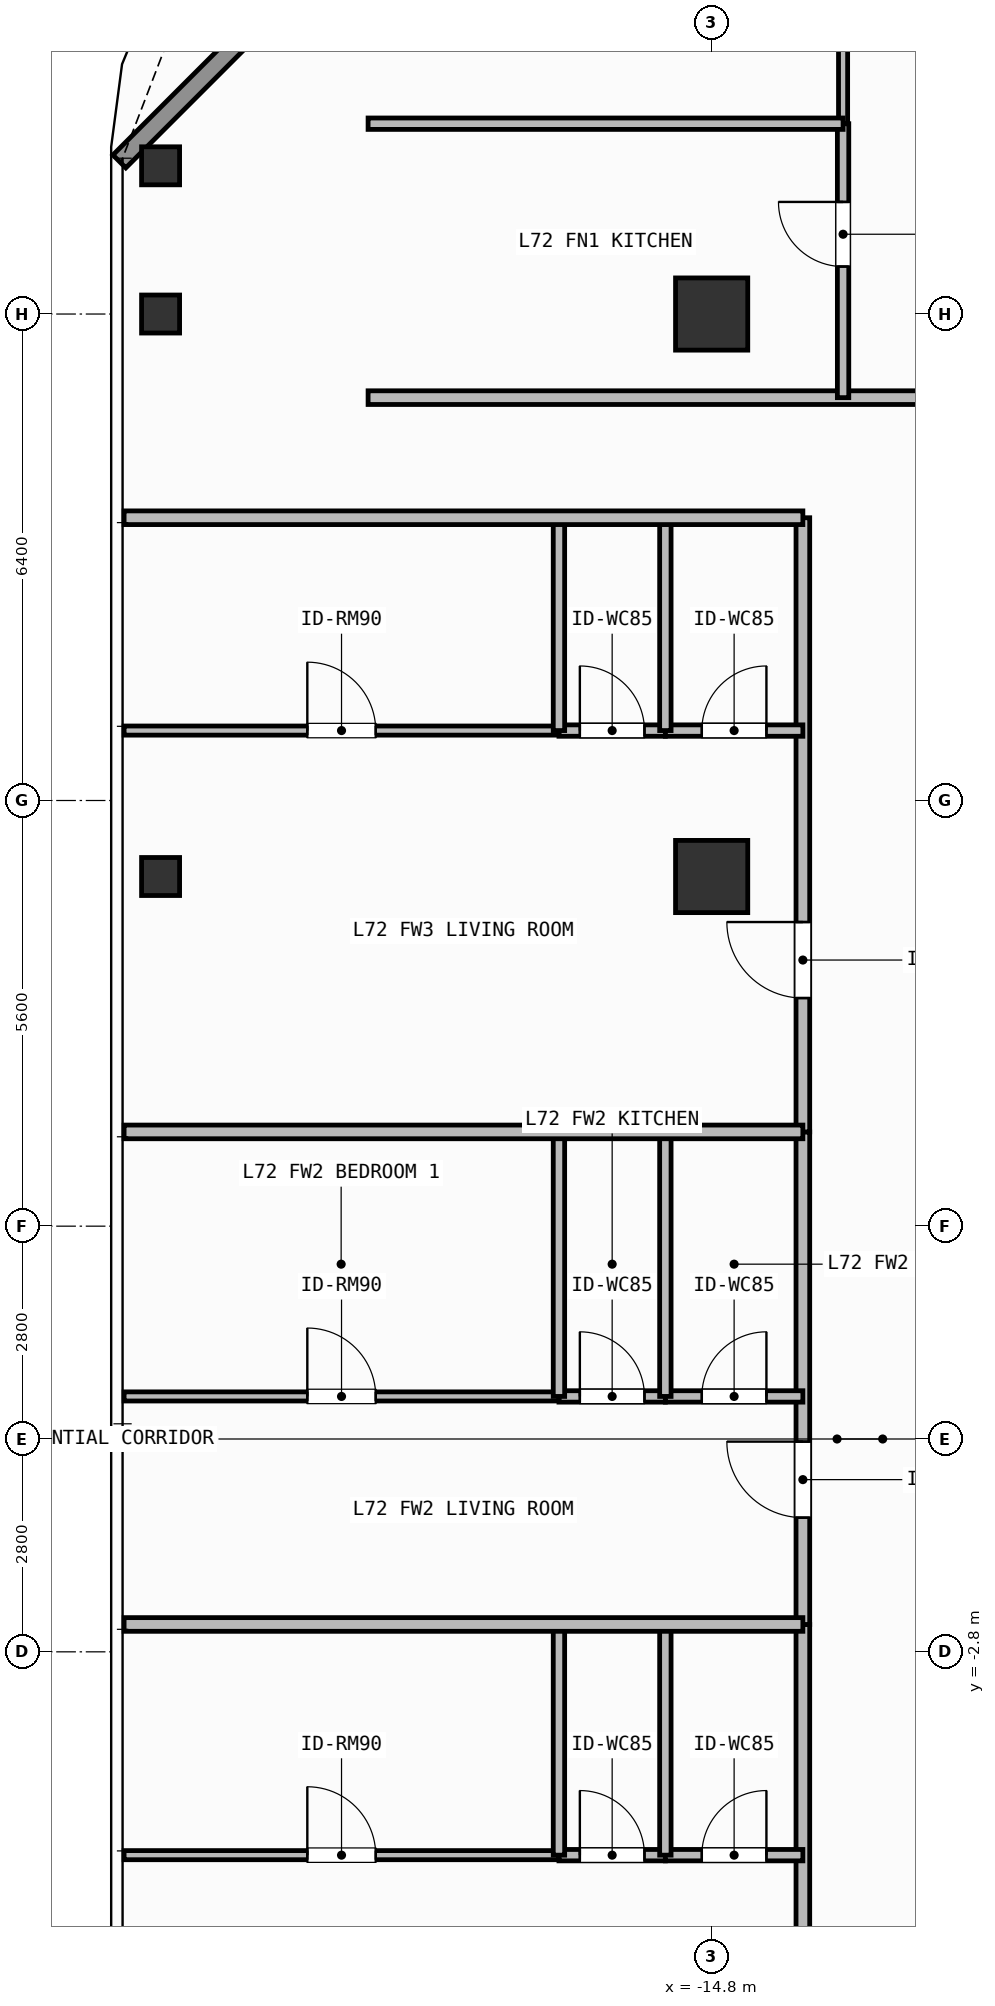
"""IFC4 building model, lengths in metres.
Left out: names, types, materials, properties, quantities, classifications, styles, units other than length and angle.
Written with IfcOpenShell. Run it as: python <this file> out.ifc"""

import sys

from ifc_helpers import new_model, si_unit, direction, frame, frame_2d, origin, origin_2d, place, context, subcontext, project, spatial, rectangle, hollow_rectangle, extrude, element, fill, save


model = new_model("IFC4")
c1 = context("Model", 3, precision=1e-05, world=origin(), true_north=direction((0.0, 1.0)))
c2 = subcontext(c1, "Body", "Model", "MODEL_VIEW")
j1 = project(units=[si_unit("LENGTHUNIT", "METRE"), si_unit("PLANEANGLEUNIT", "RADIAN")], contexts=[c1])
p1 = place(None, origin())
s1 = spatial("IfcSite", under=j1, at=p1, CompositionType="ELEMENT")
p2 = place(p1, origin())
s2 = spatial("IfcBuilding", under=s1, at=p2, CompositionType="ELEMENT")
p3 = place(p2, frame((0.0, 0.0, 293.7)))
s3 = spatial("IfcBuildingStorey", under=s2, at=p3, CompositionType="ELEMENT", Elevation=293.7)
for number, where, z_axis, x_axis in (
    (1, (-14.8, 14.8, 0.0), (0.0, 0.0, 1.0), (1.0, 0.0, 0.0)),
    (2, (-14.8, 7.4, 0.0), (0.0, 0.0, 1.0), (1.0, 0.0, 0.0)),
):
    element("IfcColumn", number, at=place(p3, frame(where, z_axis=z_axis, x_axis=x_axis)), inside=s3, PredefinedType="COLUMN", context=c2, shape_type="SweptSolid", body=[
        extrude(rectangle(XDim=0.95, YDim=0.95, at=origin_2d()), origin(), (0.0, 0.0, 1.0), 3.9),
    ])
for number, where, z_axis, x_axis in (
    (3, (-22.05, 16.75, 0.0), (0.0, 0.0, 1.0), (1.0, 0.0, 0.0)),
    (4, (-22.05, 7.4, 0.0), (0.0, 0.0, 1.0), (1.0, 0.0, 0.0)),
    (5, (-22.05, 14.8, 0.0), (0.0, 0.0, 1.0), (1.0, 0.0, 0.0)),
):
    element("IfcColumn", number, at=place(p3, frame(where, z_axis=z_axis, x_axis=x_axis)), inside=s3, PredefinedType="COLUMN", context=c2, shape_type="SweptSolid", body=[
        extrude(hollow_rectangle(XDim=0.5, YDim=0.5, WallThickness=0.025, at=origin_2d()), origin(), (0.0, 0.0, 1.0), 3.9),
    ])
p4 = place(p3, frame((-22.592, 16.808, 0.0), z_axis=(0.0, 0.0, 1.0), x_axis=(0.707106781187, 0.707106781187, 0.0)))
e6 = element("IfcWall", 6, at=p4, inside=s3, PredefinedType="SOLIDWALL", context=c2, shape_type="SweptSolid", body=[
    extrude(rectangle(XDim=6.059, YDim=0.24, at=frame_2d((3.03, 0.0))), origin(), (0.0, 0.0, 1.0), 3.68),
])
p5 = place(p4, frame((2.28, 0.0, 0.8)))
e7 = element("IfcOpeningElement", 7, at=p5, cuts=e6, PredefinedType="OPENING", context=c2, shape_type="SweptSolid", body=[
    extrude(rectangle(XDim=1.5, YDim=1.85, at=frame_2d((0.75, 0.925))), frame((0.0, 0.13, 0.0), z_axis=(0.0, -1.0, 0.0), x_axis=(1.0, 0.0, 0.0)), (0.0, 0.0, 1.0), 0.26),
])
p6 = place(p3, frame((-19.32, 13.7, 0.0), z_axis=(0.0, 0.0, 1.0), x_axis=(1.0, 0.0, 0.0)))
e8 = element("IfcWall", 8, at=p6, inside=s3, PredefinedType="PARTITIONING", context=c2, shape_type="SweptSolid", body=[
    extrude(rectangle(XDim=15.623, YDim=0.18, at=frame_2d((7.812, 0.0))), origin(), (0.0, 0.0, 1.0), 3.68),
])
p7 = place(p6, frame((7.669, 0.0, 0.0)))
e9 = element("IfcOpeningElement", 9, at=p7, cuts=e8, PredefinedType="OPENING", context=c2, shape_type="SweptSolid", body=[
    extrude(rectangle(XDim=1.0, YDim=2.2, at=frame_2d((0.5, 1.1))), frame((0.0, 0.1, 0.0), z_axis=(0.0, -1.0, 0.0), x_axis=(1.0, 0.0, 0.0)), (0.0, 0.0, 1.0), 0.2),
])
p8 = place(p3, frame((-13.071, 13.7, 0.0), z_axis=(0.0, 0.0, 1.0), x_axis=(0.0, 1.0, 0.0)))
e10 = element("IfcWall", 10, at=p8, inside=s3, PredefinedType="PARTITIONING", context=c2, shape_type="SweptSolid", body=[
    extrude(rectangle(XDim=3.604, YDim=0.15, at=frame_2d((1.802, 0.0))), origin(), (0.0, 0.0, 1.0), 3.68),
])
p9 = place(p8, frame((1.725, 0.0, 0.0)))
e11 = element("IfcOpeningElement", 11, at=p9, cuts=e10, PredefinedType="OPENING", context=c2, shape_type="SweptSolid", body=[
    extrude(rectangle(XDim=0.85, YDim=2.1, at=frame_2d((0.425, 1.05))), frame((0.0, 0.085, 0.0), z_axis=(0.0, -1.0, 0.0), x_axis=(1.0, 0.0, 0.0)), (0.0, 0.0, 1.0), 0.17),
])
p10 = place(p3, frame((-13.071, 17.304, 0.0), z_axis=(0.0, 0.0, 1.0), x_axis=(0.0, 1.0, 0.0)))
e12 = element("IfcWall", 12, at=p10, inside=s3, PredefinedType="PARTITIONING", context=c2, shape_type="SweptSolid", body=[
    extrude(rectangle(XDim=3.726, YDim=0.12, at=frame_2d((1.863, 0.0))), origin(), (0.0, 0.0, 1.0), 3.68),
])
p11 = place(p10, frame((1.413, 0.0, 0.0)))
e13 = element("IfcOpeningElement", 13, at=p11, cuts=e12, PredefinedType="OPENING", context=c2, shape_type="SweptSolid", body=[
    extrude(rectangle(XDim=0.9, YDim=2.1, at=frame_2d((0.45, 1.05))), frame((0.0, 0.07, 0.0), z_axis=(0.0, -1.0, 0.0), x_axis=(1.0, 0.0, 0.0)), (0.0, 0.0, 1.0), 0.14),
])
p12 = place(p3, frame((-13.6, -12.12, 0.0), z_axis=(0.0, 0.0, 1.0), x_axis=(0.0, 1.0, 0.0)))
e14 = element("IfcWall", 14, at=p12, inside=s3, PredefinedType="PARTITIONING", context=c2, shape_type="SweptSolid", body=[
    extrude(rectangle(XDim=9.68, YDim=0.18, at=frame_2d((4.84, 0.0))), origin(), (0.0, 0.0, 1.0), 3.68),
])
p13 = place(p12, frame((3.006, 0.0, 0.0)))
e15 = element("IfcOpeningElement", 15, at=p13, cuts=e14, PredefinedType="OPENING", context=c2, shape_type="SweptSolid", body=[
    extrude(rectangle(XDim=1.0, YDim=2.2, at=frame_2d((0.5, 1.1))), frame((0.0, 0.1, 0.0), z_axis=(0.0, -1.0, 0.0), x_axis=(1.0, 0.0, 0.0)), (0.0, 0.0, 1.0), 0.2),
])
p14 = place(p3, frame((-16.809, -5.475, 0.0), z_axis=(0.0, 0.0, 1.0), x_axis=(1.0, 0.0, 0.0)))
e16 = element("IfcWall", 16, at=p14, inside=s3, PredefinedType="PARTITIONING", context=c2, shape_type="SweptSolid", body=[
    extrude(rectangle(XDim=1.4, YDim=0.15, at=frame_2d((0.7, 0.0))), origin(), (0.0, 0.0, 1.0), 3.68),
])
p15 = place(p14, frame((0.275, 0.0, 0.0)))
e17 = element("IfcOpeningElement", 17, at=p15, cuts=e16, PredefinedType="OPENING", context=c2, shape_type="SweptSolid", body=[
    extrude(rectangle(XDim=0.85, YDim=2.1, at=frame_2d((0.425, 1.05))), frame((0.0, 0.085, 0.0), z_axis=(0.0, -1.0, 0.0), x_axis=(1.0, 0.0, 0.0)), (0.0, 0.0, 1.0), 0.17),
])
p16 = place(p3, frame((-15.409, -5.475, 0.0), z_axis=(0.0, 0.0, 1.0), x_axis=(1.0, 0.0, 0.0)))
e18 = element("IfcWall", 18, at=p16, inside=s3, PredefinedType="PARTITIONING", context=c2, shape_type="SweptSolid", body=[
    extrude(rectangle(XDim=1.809, YDim=0.15, at=frame_2d((0.904, 0.0))), origin(), (0.0, 0.0, 1.0), 3.68),
])
p17 = place(p16, frame((0.479, 0.0, 0.0)))
e19 = element("IfcOpeningElement", 19, at=p17, cuts=e18, PredefinedType="OPENING", context=c2, shape_type="SweptSolid", body=[
    extrude(rectangle(XDim=0.85, YDim=2.1, at=frame_2d((0.425, 1.05))), frame((0.0, 0.085, 0.0), z_axis=(0.0, -1.0, 0.0), x_axis=(1.0, 0.0, 0.0)), (0.0, 0.0, 1.0), 0.17),
])
p18 = place(p3, frame((-22.53, -5.475, 0.0), z_axis=(0.0, 0.0, 1.0), x_axis=(1.0, 0.0, 0.0)))
e20 = element("IfcWall", 20, at=p18, inside=s3, PredefinedType="PARTITIONING", context=c2, shape_type="SweptSolid", body=[
    extrude(rectangle(XDim=5.721, YDim=0.12, at=frame_2d((2.86, 0.0))), origin(), (0.0, 0.0, 1.0), 3.68),
])
p19 = place(p18, frame((2.41, 0.0, 0.0)))
e21 = element("IfcOpeningElement", 21, at=p19, cuts=e20, PredefinedType="OPENING", context=c2, shape_type="SweptSolid", body=[
    extrude(rectangle(XDim=0.9, YDim=2.1, at=frame_2d((0.45, 1.05))), frame((0.0, 0.07, 0.0), z_axis=(0.0, -1.0, 0.0), x_axis=(1.0, 0.0, 0.0)), (0.0, 0.0, 1.0), 0.14),
])
p20 = place(p3, frame((-13.6, -2.44, 0.0), z_axis=(0.0, 0.0, 1.0), x_axis=(0.0, 1.0, 0.0)))
e22 = element("IfcWall", 22, at=p20, inside=s3, PredefinedType="PARTITIONING", context=c2, shape_type="SweptSolid", body=[
    extrude(rectangle(XDim=6.48, YDim=0.18, at=frame_2d((3.24, 0.0))), origin(), (0.0, 0.0, 1.0), 3.68),
])
p21 = place(p20, frame((1.406, 0.0, 0.0)))
e23 = element("IfcOpeningElement", 23, at=p21, cuts=e22, PredefinedType="OPENING", context=c2, shape_type="SweptSolid", body=[
    extrude(rectangle(XDim=1.0, YDim=2.2, at=frame_2d((0.5, 1.1))), frame((0.0, 0.1, 0.0), z_axis=(0.0, -1.0, 0.0), x_axis=(1.0, 0.0, 0.0)), (0.0, 0.0, 1.0), 0.2),
])
p22 = place(p3, frame((-16.809, 0.56, 0.0), z_axis=(0.0, 0.0, 1.0), x_axis=(1.0, 0.0, 0.0)))
e24 = element("IfcWall", 24, at=p22, inside=s3, PredefinedType="PARTITIONING", context=c2, shape_type="SweptSolid", body=[
    extrude(rectangle(XDim=1.4, YDim=0.15, at=frame_2d((0.7, 0.0))), origin(), (0.0, 0.0, 1.0), 3.68),
])
p23 = place(p22, frame((0.275, 0.0, 0.0)))
e25 = element("IfcOpeningElement", 25, at=p23, cuts=e24, PredefinedType="OPENING", context=c2, shape_type="SweptSolid", body=[
    extrude(rectangle(XDim=0.85, YDim=2.1, at=frame_2d((0.425, 1.05))), frame((0.0, 0.085, 0.0), z_axis=(0.0, -1.0, 0.0), x_axis=(1.0, 0.0, 0.0)), (0.0, 0.0, 1.0), 0.17),
])
p24 = place(p3, frame((-15.409, 0.56, 0.0), z_axis=(0.0, 0.0, 1.0), x_axis=(1.0, 0.0, 0.0)))
e26 = element("IfcWall", 26, at=p24, inside=s3, PredefinedType="PARTITIONING", context=c2, shape_type="SweptSolid", body=[
    extrude(rectangle(XDim=1.809, YDim=0.15, at=frame_2d((0.904, 0.0))), origin(), (0.0, 0.0, 1.0), 3.68),
])
p25 = place(p24, frame((0.479, 0.0, 0.0)))
e27 = element("IfcOpeningElement", 27, at=p25, cuts=e26, PredefinedType="OPENING", context=c2, shape_type="SweptSolid", body=[
    extrude(rectangle(XDim=0.85, YDim=2.1, at=frame_2d((0.425, 1.05))), frame((0.0, 0.085, 0.0), z_axis=(0.0, -1.0, 0.0), x_axis=(1.0, 0.0, 0.0)), (0.0, 0.0, 1.0), 0.17),
])
p26 = place(p3, frame((-22.53, 0.56, 0.0), z_axis=(0.0, 0.0, 1.0), x_axis=(1.0, 0.0, 0.0)))
e28 = element("IfcWall", 28, at=p26, inside=s3, PredefinedType="PARTITIONING", context=c2, shape_type="SweptSolid", body=[
    extrude(rectangle(XDim=5.721, YDim=0.12, at=frame_2d((2.86, 0.0))), origin(), (0.0, 0.0, 1.0), 3.68),
])
p27 = place(p26, frame((2.41, 0.0, 0.0)))
e29 = element("IfcOpeningElement", 29, at=p27, cuts=e28, PredefinedType="OPENING", context=c2, shape_type="SweptSolid", body=[
    extrude(rectangle(XDim=0.9, YDim=2.1, at=frame_2d((0.45, 1.05))), frame((0.0, 0.07, 0.0), z_axis=(0.0, -1.0, 0.0), x_axis=(1.0, 0.0, 0.0)), (0.0, 0.0, 1.0), 0.14),
])
p28 = place(p3, frame((-13.6, 4.04, 0.0), z_axis=(0.0, 0.0, 1.0), x_axis=(0.0, 1.0, 0.0)))
e30 = element("IfcWall", 30, at=p28, inside=s3, PredefinedType="PARTITIONING", context=c2, shape_type="SweptSolid", body=[
    extrude(rectangle(XDim=8.08, YDim=0.18, at=frame_2d((4.04, 0.0))), origin(), (0.0, 0.0, 1.0), 3.68),
])
p29 = place(p28, frame((1.761, 0.0, 0.0)))
e31 = element("IfcOpeningElement", 31, at=p29, cuts=e30, PredefinedType="OPENING", context=c2, shape_type="SweptSolid", body=[
    extrude(rectangle(XDim=1.0, YDim=2.2, at=frame_2d((0.5, 1.1))), frame((0.0, 0.1, 0.0), z_axis=(0.0, -1.0, 0.0), x_axis=(1.0, 0.0, 0.0)), (0.0, 0.0, 1.0), 0.2),
])
p30 = place(p3, frame((-16.809, 9.32, 0.0), z_axis=(0.0, 0.0, 1.0), x_axis=(1.0, 0.0, 0.0)))
e32 = element("IfcWall", 32, at=p30, inside=s3, PredefinedType="PARTITIONING", context=c2, shape_type="SweptSolid", body=[
    extrude(rectangle(XDim=1.4, YDim=0.15, at=frame_2d((0.7, 0.0))), origin(), (0.0, 0.0, 1.0), 3.68),
])
p31 = place(p30, frame((0.275, 0.0, 0.0)))
e33 = element("IfcOpeningElement", 33, at=p31, cuts=e32, PredefinedType="OPENING", context=c2, shape_type="SweptSolid", body=[
    extrude(rectangle(XDim=0.85, YDim=2.1, at=frame_2d((0.425, 1.05))), frame((0.0, 0.085, 0.0), z_axis=(0.0, -1.0, 0.0), x_axis=(1.0, 0.0, 0.0)), (0.0, 0.0, 1.0), 0.17),
])
p32 = place(p3, frame((-15.409, 9.32, 0.0), z_axis=(0.0, 0.0, 1.0), x_axis=(1.0, 0.0, 0.0)))
e34 = element("IfcWall", 34, at=p32, inside=s3, PredefinedType="PARTITIONING", context=c2, shape_type="SweptSolid", body=[
    extrude(rectangle(XDim=1.809, YDim=0.15, at=frame_2d((0.904, 0.0))), origin(), (0.0, 0.0, 1.0), 3.68),
])
p33 = place(p32, frame((0.479, 0.0, 0.0)))
e35 = element("IfcOpeningElement", 35, at=p33, cuts=e34, PredefinedType="OPENING", context=c2, shape_type="SweptSolid", body=[
    extrude(rectangle(XDim=0.85, YDim=2.1, at=frame_2d((0.425, 1.05))), frame((0.0, 0.085, 0.0), z_axis=(0.0, -1.0, 0.0), x_axis=(1.0, 0.0, 0.0)), (0.0, 0.0, 1.0), 0.17),
])
p34 = place(p3, frame((-22.53, 9.32, 0.0), z_axis=(0.0, 0.0, 1.0), x_axis=(1.0, 0.0, 0.0)))
e36 = element("IfcWall", 36, at=p34, inside=s3, PredefinedType="PARTITIONING", context=c2, shape_type="SweptSolid", body=[
    extrude(rectangle(XDim=5.721, YDim=0.12, at=frame_2d((2.86, 0.0))), origin(), (0.0, 0.0, 1.0), 3.68),
])
p35 = place(p34, frame((2.41, 0.0, 0.0)))
e37 = element("IfcOpeningElement", 37, at=p35, cuts=e36, PredefinedType="OPENING", context=c2, shape_type="SweptSolid", body=[
    extrude(rectangle(XDim=0.9, YDim=2.1, at=frame_2d((0.45, 1.05))), frame((0.0, 0.07, 0.0), z_axis=(0.0, -1.0, 0.0), x_axis=(1.0, 0.0, 0.0)), (0.0, 0.0, 1.0), 0.14),
])
p36 = place(p3, frame((-19.32, 17.304, 0.0), z_axis=(0.0, 0.0, 1.0), x_axis=(1.0, 0.0, 0.0)))
e38 = element("IfcWall", 38, at=p36, inside=s3, PredefinedType="PARTITIONING", context=c2, shape_type="SweptSolid", body=[
    extrude(rectangle(XDim=6.249, YDim=0.15, at=frame_2d((3.125, 0.0))), origin(), (0.0, 0.0, 1.0), 3.68),
])
for number, where, z_axis, x_axis in (
    (39, (-15.409, -5.475, 0.0), (0.0, 0.0, 1.0), (0.0, 1.0, 0.0)),
    (40, (-16.809, -5.475, 0.0), (0.0, 0.0, 1.0), (0.0, 1.0, 0.0)),
):
    element("IfcWall", number, at=place(p3, frame(where, z_axis=z_axis, x_axis=x_axis)), inside=s3, PredefinedType="PARTITIONING", context=c2, shape_type="SweptSolid", body=[
        extrude(rectangle(XDim=3.035, YDim=0.15, at=frame_2d((1.518, 0.0))), origin(), (0.0, 0.0, 1.0), 3.68),
    ])
for number, where, z_axis, x_axis in (
    (41, (-15.409, 0.56, 0.0), (0.0, 0.0, 1.0), (0.0, 1.0, 0.0)),
    (42, (-16.809, 0.56, 0.0), (0.0, 0.0, 1.0), (0.0, 1.0, 0.0)),
):
    element("IfcWall", number, at=place(p3, frame(where, z_axis=z_axis, x_axis=x_axis)), inside=s3, PredefinedType="PARTITIONING", context=c2, shape_type="SweptSolid", body=[
        extrude(rectangle(XDim=3.48, YDim=0.15, at=frame_2d((1.74, 0.0))), origin(), (0.0, 0.0, 1.0), 3.68),
    ])
p37 = place(p3, frame((-22.53, -2.44, 0.0), z_axis=(0.0, 0.0, 1.0), x_axis=(1.0, 0.0, 0.0)))
e43 = element("IfcWall", 43, at=p37, inside=s3, PredefinedType="PARTITIONING", context=c2, shape_type="SweptSolid", body=[
    extrude(rectangle(XDim=8.93, YDim=0.18, at=frame_2d((4.465, 0.0))), origin(), (0.0, 0.0, 1.0), 3.68),
])
for number, where, z_axis, x_axis in (
    (44, (-15.409, 9.32, 0.0), (0.0, 0.0, 1.0), (0.0, 1.0, 0.0)),
    (45, (-16.809, 9.32, 0.0), (0.0, 0.0, 1.0), (0.0, 1.0, 0.0)),
):
    element("IfcWall", number, at=place(p3, frame(where, z_axis=z_axis, x_axis=x_axis)), inside=s3, PredefinedType="PARTITIONING", context=c2, shape_type="SweptSolid", body=[
        extrude(rectangle(XDim=2.8, YDim=0.15, at=frame_2d((1.4, 0.0))), origin(), (0.0, 0.0, 1.0), 3.68),
    ])
for number, where, z_axis, x_axis in (
    (46, (-22.53, 4.04, 0.0), (0.0, 0.0, 1.0), (1.0, 0.0, 0.0)),
    (47, (-22.53, 12.12, 0.0), (0.0, 0.0, 1.0), (1.0, 0.0, 0.0)),
):
    element("IfcWall", number, at=place(p3, frame(where, z_axis=z_axis, x_axis=x_axis)), inside=s3, PredefinedType="PARTITIONING", context=c2, shape_type="SweptSolid", body=[
        extrude(rectangle(XDim=8.93, YDim=0.18, at=frame_2d((4.465, 0.0))), origin(), (0.0, 0.0, 1.0), 3.68),
    ])
p38 = place(p9, origin())
e48 = element("IfcDoor", 48, at=p38, inside=s3, OperationType="SINGLE_SWING_RIGHT", PredefinedType="DOOR", context=c2, shape_type="SweptSolid", body=[
    extrude(rectangle(XDim=0.85, YDim=2.1, at=frame_2d((0.425, 1.05))), frame((0.0, 0.025, 0.0), z_axis=(0.0, -1.0, 0.0), x_axis=(1.0, 0.0, 0.0)), (0.0, 0.0, 1.0), 0.05),
])
fill(e11, e48)
p39 = place(p15, origin())
e49 = element("IfcDoor", 49, at=p39, inside=s3, OperationType="SINGLE_SWING_LEFT", PredefinedType="DOOR", context=c2, shape_type="SweptSolid", body=[
    extrude(rectangle(XDim=0.85, YDim=2.1, at=frame_2d((0.425, 1.05))), frame((0.0, 0.025, 0.0), z_axis=(0.0, -1.0, 0.0), x_axis=(1.0, 0.0, 0.0)), (0.0, 0.0, 1.0), 0.05),
])
fill(e17, e49)
p40 = place(p17, origin())
e50 = element("IfcDoor", 50, at=p40, inside=s3, OperationType="SINGLE_SWING_RIGHT", PredefinedType="DOOR", context=c2, shape_type="SweptSolid", body=[
    extrude(rectangle(XDim=0.85, YDim=2.1, at=frame_2d((0.425, 1.05))), frame((0.0, 0.025, 0.0), z_axis=(0.0, -1.0, 0.0), x_axis=(1.0, 0.0, 0.0)), (0.0, 0.0, 1.0), 0.05),
])
fill(e19, e50)
p41 = place(p19, origin())
e51 = element("IfcDoor", 51, at=p41, inside=s3, OperationType="SINGLE_SWING_LEFT", PredefinedType="DOOR", context=c2, shape_type="SweptSolid", body=[
    extrude(rectangle(XDim=0.9, YDim=2.1, at=frame_2d((0.45, 1.05))), frame((0.0, 0.025, 0.0), z_axis=(0.0, -1.0, 0.0), x_axis=(1.0, 0.0, 0.0)), (0.0, 0.0, 1.0), 0.05),
])
fill(e21, e51)
p42 = place(p21, origin())
e52 = element("IfcDoor", 52, at=p42, inside=s3, OperationType="SINGLE_SWING_RIGHT", PredefinedType="DOOR", context=c2, shape_type="SweptSolid", body=[
    extrude(rectangle(XDim=1.0, YDim=2.2, at=frame_2d((0.5, 1.1))), frame((0.0, 0.025, 0.0), z_axis=(0.0, -1.0, 0.0), x_axis=(1.0, 0.0, 0.0)), (0.0, 0.0, 1.0), 0.05),
])
fill(e23, e52)
p43 = place(p23, origin())
e53 = element("IfcDoor", 53, at=p43, inside=s3, OperationType="SINGLE_SWING_LEFT", PredefinedType="DOOR", context=c2, shape_type="SweptSolid", body=[
    extrude(rectangle(XDim=0.85, YDim=2.1, at=frame_2d((0.425, 1.05))), frame((0.0, 0.025, 0.0), z_axis=(0.0, -1.0, 0.0), x_axis=(1.0, 0.0, 0.0)), (0.0, 0.0, 1.0), 0.05),
])
fill(e25, e53)
p44 = place(p25, origin())
e54 = element("IfcDoor", 54, at=p44, inside=s3, OperationType="SINGLE_SWING_RIGHT", PredefinedType="DOOR", context=c2, shape_type="SweptSolid", body=[
    extrude(rectangle(XDim=0.85, YDim=2.1, at=frame_2d((0.425, 1.05))), frame((0.0, 0.025, 0.0), z_axis=(0.0, -1.0, 0.0), x_axis=(1.0, 0.0, 0.0)), (0.0, 0.0, 1.0), 0.05),
])
fill(e27, e54)
p45 = place(p27, origin())
e55 = element("IfcDoor", 55, at=p45, inside=s3, OperationType="SINGLE_SWING_LEFT", PredefinedType="DOOR", context=c2, shape_type="SweptSolid", body=[
    extrude(rectangle(XDim=0.9, YDim=2.1, at=frame_2d((0.45, 1.05))), frame((0.0, 0.025, 0.0), z_axis=(0.0, -1.0, 0.0), x_axis=(1.0, 0.0, 0.0)), (0.0, 0.0, 1.0), 0.05),
])
fill(e29, e55)
p46 = place(p29, origin())
e56 = element("IfcDoor", 56, at=p46, inside=s3, OperationType="SINGLE_SWING_RIGHT", PredefinedType="DOOR", context=c2, shape_type="SweptSolid", body=[
    extrude(rectangle(XDim=1.0, YDim=2.2, at=frame_2d((0.5, 1.1))), frame((0.0, 0.025, 0.0), z_axis=(0.0, -1.0, 0.0), x_axis=(1.0, 0.0, 0.0)), (0.0, 0.0, 1.0), 0.05),
])
fill(e31, e56)
p47 = place(p31, origin())
e57 = element("IfcDoor", 57, at=p47, inside=s3, OperationType="SINGLE_SWING_LEFT", PredefinedType="DOOR", context=c2, shape_type="SweptSolid", body=[
    extrude(rectangle(XDim=0.85, YDim=2.1, at=frame_2d((0.425, 1.05))), frame((0.0, 0.025, 0.0), z_axis=(0.0, -1.0, 0.0), x_axis=(1.0, 0.0, 0.0)), (0.0, 0.0, 1.0), 0.05),
])
fill(e33, e57)
p48 = place(p33, origin())
e58 = element("IfcDoor", 58, at=p48, inside=s3, OperationType="SINGLE_SWING_RIGHT", PredefinedType="DOOR", context=c2, shape_type="SweptSolid", body=[
    extrude(rectangle(XDim=0.85, YDim=2.1, at=frame_2d((0.425, 1.05))), frame((0.0, 0.025, 0.0), z_axis=(0.0, -1.0, 0.0), x_axis=(1.0, 0.0, 0.0)), (0.0, 0.0, 1.0), 0.05),
])
fill(e35, e58)
p49 = place(p35, origin())
e59 = element("IfcDoor", 59, at=p49, inside=s3, OperationType="SINGLE_SWING_LEFT", PredefinedType="DOOR", context=c2, shape_type="SweptSolid", body=[
    extrude(rectangle(XDim=0.9, YDim=2.1, at=frame_2d((0.45, 1.05))), frame((0.0, 0.025, 0.0), z_axis=(0.0, -1.0, 0.0), x_axis=(1.0, 0.0, 0.0)), (0.0, 0.0, 1.0), 0.05),
])
fill(e37, e59)
save(model, sys.argv[1])
